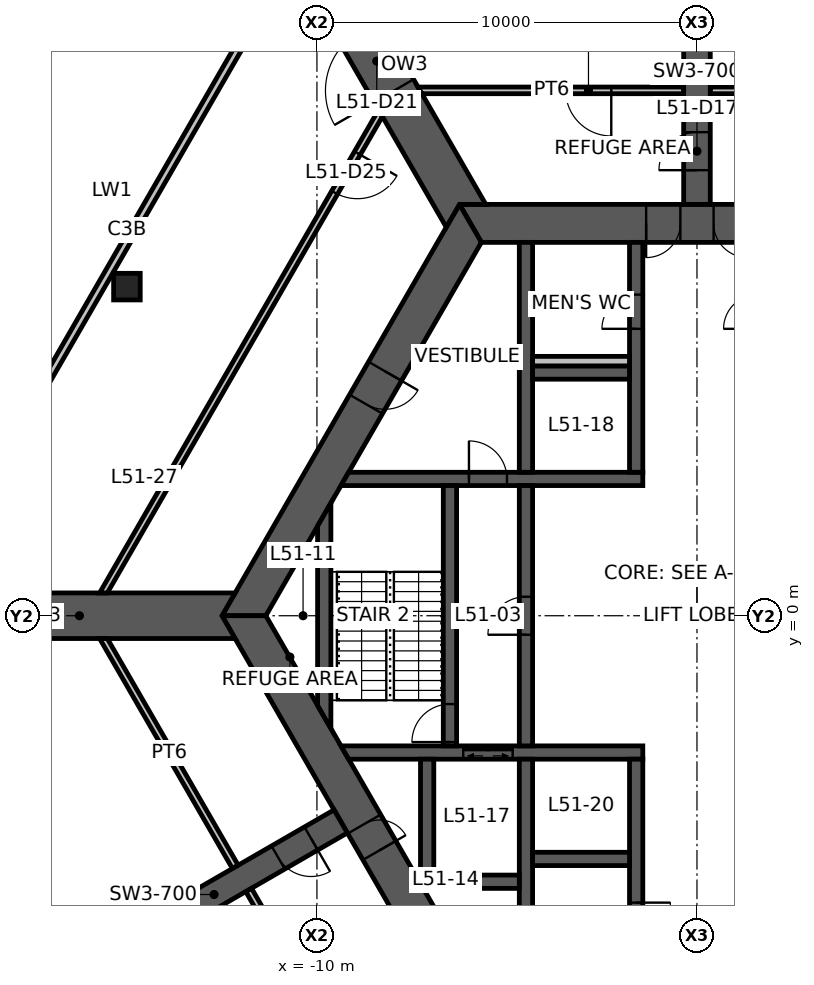
"""IFC4 building model, lengths in metres.
Left out: names, types, materials, properties, quantities, classifications, styles, units other than length and angle.
Written with IfcOpenShell. Run it as: python <this file> out.ifc"""

import sys

from ifc_helpers import new_model, si_unit, direction, frame, frame_2d, origin, origin_2d, place, context, subcontext, project, spatial, polyline, rectangle, hollow_rectangle, outline, extrude, element, fill, save


model = new_model("IFC4")
c1 = context("Model", 3, precision=1e-05, world=origin(), true_north=direction((0.0, 1.0)))
c2 = subcontext(c1, "Body", "Model", "MODEL_VIEW")
j1 = project(units=[si_unit("LENGTHUNIT", "METRE"), si_unit("PLANEANGLEUNIT", "RADIAN")], contexts=[c1])
p1 = place(None, origin())
s1 = spatial("IfcSite", under=j1, at=p1, CompositionType="ELEMENT")
p2 = place(p1, origin())
s2 = spatial("IfcBuilding", under=s1, at=p2, CompositionType="ELEMENT")
p3 = place(p2, frame((0.0, 0.0, 203.3)))
s3 = spatial("IfcBuildingStorey", under=s2, at=p3, CompositionType="ELEMENT", Elevation=203.3)
p4 = place(p3, frame((-15.0, 8.66, 0.0), z_axis=(0.0, 0.0, 1.0), x_axis=(1.0, 0.0, 0.0)))
e1 = element("IfcColumn", 1, at=p4, inside=s3, PredefinedType="COLUMN", context=c2, shape_type="SweptSolid", body=[
    extrude(hollow_rectangle(XDim=0.7, YDim=0.7, WallThickness=0.036, at=origin_2d()), origin(), (0.0, 0.0, 1.0), 5.0),
])
p5 = place(p3, frame((5.961, 10.325, 0.0), z_axis=(0.0, 0.0, 1.0), x_axis=(-1.0, 0.0, 0.0)))
e2 = element("IfcWall", 2, at=p5, inside=s3, PredefinedType="SHEAR", context=c2, shape_type="SweptSolid", body=[
    extrude(outline(polyline([(-0.289, -0.5), (4.624, -0.5), (5.523, -0.5), (6.399, -0.5), (7.299, -0.5), (12.211, -0.5), (11.634, 0.5), (7.299, 0.5), (6.399, 0.5), (5.523, 0.5), (4.624, 0.5), (0.289, 0.5), (-0.289, -0.5)])), origin(), (0.0, 0.0, 1.0), 5.0),
])
p6 = place(p5, frame((6.399, 0.0, 0.0)))
e3 = element("IfcOpeningElement", 3, at=p6, cuts=e2, PredefinedType="OPENING", context=c2, shape_type="SweptSolid", body=[
    extrude(rectangle(XDim=0.9, YDim=2.1, at=frame_2d((0.45, 1.05))), frame((0.0, 0.51, 0.0), z_axis=(0.0, -1.0, 0.0), x_axis=(1.0, 0.0, 0.0)), (0.0, 0.0, 1.0), 1.02),
])
p7 = place(p5, frame((4.624, 0.0, 0.0)))
e4 = element("IfcOpeningElement", 4, at=p7, cuts=e2, PredefinedType="OPENING", context=c2, shape_type="SweptSolid", body=[
    extrude(rectangle(XDim=0.9, YDim=2.1, at=frame_2d((0.45, 1.05))), frame((0.0, 0.51, 0.0), z_axis=(0.0, -1.0, 0.0), x_axis=(1.0, 0.0, 0.0)), (0.0, 0.0, 1.0), 1.02),
])
p8 = place(p3, frame((-5.961, 10.325, 0.0), z_axis=(0.0, 0.0, 1.0), x_axis=(-0.500004296715, -0.866022923061, 0.0)))
e5 = element("IfcWall", 5, at=p8, inside=s3, PredefinedType="SHEAR", context=c2, shape_type="SweptSolid", body=[
    extrude(outline(polyline([(-0.289, -0.5), (4.494, -0.5), (5.494, -0.5), (12.211, -0.5), (11.634, 0.5), (5.494, 0.5), (4.494, 0.5), (0.289, 0.5), (-0.289, -0.5)])), origin(), (0.0, 0.0, 1.0), 5.0),
])
p9 = place(p8, frame((4.494, 0.0, 0.0)))
e6 = element("IfcOpeningElement", 6, at=p9, cuts=e5, PredefinedType="OPENING", context=c2, shape_type="SweptSolid", body=[
    extrude(rectangle(XDim=1.0, YDim=2.1, at=frame_2d((0.5, 1.05))), frame((0.0, 0.51, 0.0), z_axis=(0.0, -1.0, 0.0), x_axis=(1.0, 0.0, 0.0)), (0.0, 0.0, 1.0), 1.02),
])
p10 = place(p3, frame((-11.922, 0.0, 0.0), z_axis=(0.0, 0.0, 1.0), x_axis=(0.500004296715, -0.866022923061, 0.0)))
e7 = element("IfcWall", 7, at=p10, inside=s3, PredefinedType="SHEAR", context=c2, shape_type="SweptSolid", body=[
    extrude(outline(polyline([(-0.289, -0.5), (6.331, -0.5), (7.131, -0.5), (12.211, -0.5), (11.634, 0.5), (7.131, 0.5), (6.331, 0.5), (0.289, 0.5), (-0.289, -0.5)])), origin(), (0.0, 0.0, 1.0), 5.0),
])
p11 = place(p10, frame((6.331, 0.0, 0.0)))
e8 = element("IfcOpeningElement", 8, at=p11, cuts=e7, PredefinedType="OPENING", context=c2, shape_type="SweptSolid", body=[
    extrude(rectangle(XDim=0.8, YDim=2.1, at=frame_2d((0.4, 1.05))), frame((0.0, 0.51, 0.0), z_axis=(0.0, -1.0, 0.0), x_axis=(1.0, 0.0, 0.0)), (0.0, 0.0, 1.0), 1.02),
])
p12 = place(p3, frame((0.0, 10.825, 0.0), z_axis=(0.0, 0.0, 1.0), x_axis=(0.0, 1.0, 0.0)))
e9 = element("IfcWall", 9, at=p12, inside=s3, PredefinedType="SHEAR", context=c2, shape_type="SweptSolid", body=[
    extrude(rectangle(XDim=6.946, YDim=0.7, at=frame_2d((3.473, 0.0))), origin(), (0.0, 0.0, 1.0), 5.0),
])
p13 = place(p12, frame((0.9, 0.0, 0.0)))
e10 = element("IfcOpeningElement", 10, at=p13, cuts=e9, PredefinedType="OPENING", context=c2, shape_type="SweptSolid", body=[
    extrude(rectangle(XDim=1.0, YDim=2.1, at=frame_2d((0.5, 1.05))), frame((0.0, 0.36, 0.0), z_axis=(0.0, -1.0, 0.0), x_axis=(1.0, 0.0, 0.0)), (0.0, 0.0, 1.0), 0.72),
])
p14 = place(p3, frame((-9.375, -5.413, 0.0), z_axis=(0.0, 0.0, 1.0), x_axis=(-0.866032377459, -0.499987921047, 0.0)))
e11 = element("IfcWall", 11, at=p14, inside=s3, PredefinedType="SHEAR", context=c2, shape_type="SweptSolid", body=[
    extrude(rectangle(XDim=7.696, YDim=0.7, at=frame_2d((3.848, 0.0))), origin(), (0.0, 0.0, 1.0), 5.0),
])
p15 = place(p14, frame((0.9, 0.0, 0.0)))
e12 = element("IfcOpeningElement", 12, at=p15, cuts=e11, PredefinedType="OPENING", context=c2, shape_type="SweptSolid", body=[
    extrude(rectangle(XDim=1.0, YDim=2.1, at=frame_2d((0.5, 1.05))), frame((0.0, 0.36, 0.0), z_axis=(0.0, -1.0, 0.0), x_axis=(1.0, 0.0, 0.0)), (0.0, 0.0, 1.0), 0.72),
])
p16 = place(p3, frame((-6.25, 10.825, -1.15), z_axis=(0.0, 0.0, 1.0), x_axis=(-0.50000045744, 0.866025139681, 0.0)))
e13 = element("IfcWall", 13, at=p16, inside=s3, PredefinedType="SHEAR", context=c2, shape_type="SweptSolid", body=[
    extrude(outline(polyline([(-0.346, -0.6), (3.453, -0.6), (5.253, -0.6), (7.5, -0.6), (7.5, 0.6), (5.253, 0.6), (3.453, 0.6), (-0.346, 0.6), (0.0, 0.0), (-0.346, -0.6)])), origin(), (0.0, 0.0, 1.0), 6.15),
])
p17 = place(p16, frame((3.453, 0.0, 1.15)))
e14 = element("IfcOpeningElement", 14, at=p17, cuts=e13, PredefinedType="OPENING", context=c2, shape_type="SweptSolid", body=[
    extrude(rectangle(XDim=1.8, YDim=2.4, at=frame_2d((0.9, 1.2))), frame((0.0, 0.61, 0.0), z_axis=(0.0, -1.0, 0.0), x_axis=(1.0, 0.0, 0.0)), (0.0, 0.0, 1.0), 1.22),
])
p18 = place(p3, frame((-12.5, 0.0, -1.15), z_axis=(0.0, 0.0, 1.0), x_axis=(-1.0, 0.0, 0.0)))
e15 = element("IfcWall", 15, at=p18, inside=s3, PredefinedType="SHEAR", context=c2, shape_type="SweptSolid", body=[
    extrude(outline(polyline([(-0.346, -0.6), (7.5, -0.6), (7.5, 0.6), (-0.346, 0.6), (0.0, 0.0), (-0.346, -0.6)])), origin(), (0.0, 0.0, 1.0), 6.15),
])
p19 = place(p3, frame((-10.396, 17.834, 0.0), z_axis=(0.0, 0.0, 1.0), x_axis=(-0.499993861681, -0.866028947716, 0.0)))
e16 = element("IfcWall", 16, at=p19, inside=s3, PredefinedType="ELEMENTEDWALL", context=c2, shape_type="SweptSolid", body=[
    extrude(rectangle(XDim=19.986, YDim=0.2, at=frame_2d((9.993, 0.0))), origin(), (0.0, 0.0, 1.0), 5.0),
])
p20 = place(p3, frame((-9.266, 3.6, 0.0), z_axis=(0.0, 0.0, 1.0), x_axis=(1.0, 0.0, 0.0)))
e17 = element("IfcWall", 17, at=p20, inside=s3, PredefinedType="SHEAR", context=c2, shape_type="SweptSolid", body=[
    extrude(outline(polyline([(-0.101, -0.175), (3.266, -0.175), (4.266, -0.175), (7.841, -0.175), (7.841, 0.175), (4.266, 0.175), (3.266, 0.175), (0.101, 0.175), (-0.101, -0.175)])), origin(), (0.0, 0.0, 1.0), 5.0),
])
p21 = place(p20, frame((3.266, 0.0, 0.0)))
e18 = element("IfcOpeningElement", 18, at=p21, cuts=e17, PredefinedType="OPENING", context=c2, shape_type="SweptSolid", body=[
    extrude(rectangle(XDim=1.0, YDim=2.1, at=frame_2d((0.5, 1.05))), frame((0.0, 0.185, 0.0), z_axis=(0.0, -1.0, 0.0), x_axis=(1.0, 0.0, 0.0)), (0.0, 0.0, 1.0), 0.37),
])
p22 = place(p3, frame((-9.266, -3.6, 0.0), z_axis=(0.0, 0.0, 1.0), x_axis=(1.0, 0.0, 0.0)))
e19 = element("IfcWall", 19, at=p22, inside=s3, PredefinedType="SHEAR", context=c2, shape_type="SweptSolid", body=[
    extrude(outline(polyline([(0.101, -0.175), (3.116, -0.175), (4.417, -0.175), (7.841, -0.175), (7.841, 0.175), (4.417, 0.175), (3.116, 0.175), (-0.101, 0.175), (0.101, -0.175)])), origin(), (0.0, 0.0, 1.0), 5.0),
])
p23 = place(p22, frame((3.116, 0.0, 0.0)))
e20 = element("IfcOpeningElement", 20, at=p23, cuts=e19, PredefinedType="OPENING", context=c2, shape_type="SweptSolid", body=[
    extrude(rectangle(XDim=1.3, YDim=2.1, at=frame_2d((0.65, 1.05))), frame((0.0, 0.185, 0.0), z_axis=(0.0, -1.0, 0.0), x_axis=(1.0, 0.0, 0.0)), (0.0, 0.0, 1.0), 0.37),
])
p24 = place(p3, frame((-1.6, 3.775, 0.0), z_axis=(0.0, 0.0, 1.0), x_axis=(0.0, 1.0, 0.0)))
e21 = element("IfcWall", 21, at=p24, inside=s3, PredefinedType="SHEAR", context=c2, shape_type="SweptSolid", body=[
    extrude(rectangle(XDim=6.05, YDim=0.35, at=frame_2d((3.025, 0.0))), origin(), (0.0, 0.0, 1.0), 5.0),
])
p25 = place(p24, frame((3.775, 0.0, 0.0)))
e22 = element("IfcOpeningElement", 22, at=p25, cuts=e21, PredefinedType="OPENING", context=c2, shape_type="SweptSolid", body=[
    extrude(rectangle(XDim=0.9, YDim=2.1, at=frame_2d((0.45, 1.05))), frame((0.0, 0.185, 0.0), z_axis=(0.0, -1.0, 0.0), x_axis=(1.0, 0.0, 0.0)), (0.0, 0.0, 1.0), 0.37),
])
p26 = place(p3, frame((-1.6, -3.775, 0.0), z_axis=(0.0, 0.0, 1.0), x_axis=(0.0, -1.0, 0.0)))
e23 = element("IfcWall", 23, at=p26, inside=s3, PredefinedType="SHEAR", context=c2, shape_type="SweptSolid", body=[
    extrude(rectangle(XDim=6.05, YDim=0.35, at=frame_2d((3.025, 0.0))), origin(), (0.0, 0.0, 1.0), 5.0),
])
p27 = place(p26, frame((3.775, 0.0, 0.0)))
e24 = element("IfcOpeningElement", 24, at=p27, cuts=e23, PredefinedType="OPENING", context=c2, shape_type="SweptSolid", body=[
    extrude(rectangle(XDim=0.9, YDim=2.1, at=frame_2d((0.45, 1.05))), frame((0.0, 0.185, 0.0), z_axis=(0.0, -1.0, 0.0), x_axis=(1.0, 0.0, 0.0)), (0.0, 0.0, 1.0), 0.37),
])
p28 = place(p3, frame((-4.5, -3.425, 0.0), z_axis=(0.0, 0.0, 1.0), x_axis=(0.0, 1.0, 0.0)))
e25 = element("IfcWall", 25, at=p28, inside=s3, PredefinedType="SHEAR", context=c2, shape_type="SweptSolid", body=[
    extrude(rectangle(XDim=6.85, YDim=0.35, at=frame_2d((3.425, 0.0))), origin(), (0.0, 0.0, 1.0), 5.0),
])
p29 = place(p28, frame((2.925, 0.0, 0.0)))
e26 = element("IfcOpeningElement", 26, at=p29, cuts=e25, PredefinedType="OPENING", context=c2, shape_type="SweptSolid", body=[
    extrude(rectangle(XDim=1.0, YDim=2.1, at=frame_2d((0.5, 1.05))), frame((0.0, 0.185, 0.0), z_axis=(0.0, -1.0, 0.0), x_axis=(1.0, 0.0, 0.0)), (0.0, 0.0, 1.0), 0.37),
])
p30 = place(p3, frame((-6.5, -3.425, 0.0), z_axis=(0.0, 0.0, 1.0), x_axis=(0.0, 1.0, 0.0)))
e27 = element("IfcWall", 27, at=p30, inside=s3, PredefinedType="SHEAR", context=c2, shape_type="SweptSolid", body=[
    extrude(rectangle(XDim=6.85, YDim=0.35, at=frame_2d((3.425, 0.0))), origin(), (0.0, 0.0, 1.0), 5.0),
])
p31 = place(p30, frame((0.1, 0.0, 0.0)))
e28 = element("IfcOpeningElement", 28, at=p31, cuts=e27, PredefinedType="OPENING", context=c2, shape_type="SweptSolid", body=[
    extrude(rectangle(XDim=1.0, YDim=2.1, at=frame_2d((0.5, 1.05))), frame((0.0, 0.185, 0.0), z_axis=(0.0, -1.0, 0.0), x_axis=(1.0, 0.0, 0.0)), (0.0, 0.0, 1.0), 0.37),
])
for number, where, z_axis, x_axis in (
    (29, (-4.5, 3.775, 0.0), (0.0, 0.0, 1.0), (0.0, 1.0, 0.0)),
    (30, (-4.5, -3.775, 0.0), (0.0, 0.0, 1.0), (0.0, -1.0, 0.0)),
):
    element("IfcWall", number, at=place(p3, frame(where, z_axis=z_axis, x_axis=x_axis)), inside=s3, PredefinedType="SHEAR", context=c2, shape_type="SweptSolid", body=[
        extrude(rectangle(XDim=6.05, YDim=0.35, at=frame_2d((3.025, 0.0))), origin(), (0.0, 0.0, 1.0), 5.0),
    ])
for number, where, z_axis, x_axis in (
    (31, (-4.325, 6.4, 0.0), (0.0, 0.0, 1.0), (1.0, 0.0, 0.0)),
    (32, (-4.325, -6.4, 0.0), (0.0, 0.0, 1.0), (1.0, 0.0, 0.0)),
):
    element("IfcWall", number, at=place(p3, frame(where, z_axis=z_axis, x_axis=x_axis)), inside=s3, PredefinedType="SHEAR", context=c2, shape_type="SweptSolid", body=[
        extrude(rectangle(XDim=2.55, YDim=0.35, at=frame_2d((1.275, 0.0))), origin(), (0.0, 0.0, 1.0), 5.0),
    ])
p32 = place(p3, frame((-6.925, -7.0, 0.0), z_axis=(0.0, 0.0, 1.0), x_axis=(1.0, 0.0, 0.0)))
e33 = element("IfcWall", 33, at=p32, inside=s3, PredefinedType="SHEAR", context=c2, shape_type="SweptSolid", body=[
    extrude(rectangle(XDim=2.25, YDim=0.35, at=frame_2d((1.125, 0.0))), origin(), (0.0, 0.0, 1.0), 5.0),
])
p33 = place(p3, frame((-7.1, -3.775, 0.0), z_axis=(0.0, 0.0, 1.0), x_axis=(0.0, -1.0, 0.0)))
e34 = element("IfcWall", 34, at=p33, inside=s3, PredefinedType="SHEAR", context=c2, shape_type="SweptSolid", body=[
    extrude(outline(polyline([(0.0, -0.175), (3.274, -0.175), (3.4, 0.0), (3.4, 0.175), (0.0, 0.175), (0.0, -0.175)])), origin(), (0.0, 0.0, 1.0), 5.0),
])
p34 = place(p3, frame((-9.808, -2.662, 0.0), z_axis=(0.0, 0.0, 1.0), x_axis=(0.0, 1.0, 0.0)))
e35 = element("IfcWall", 35, at=p34, inside=s3, PredefinedType="SHEAR", context=c2, shape_type="SweptSolid", body=[
    extrude(outline(polyline([(-0.303, -0.175), (5.628, -0.175), (5.021, 0.175), (0.303, 0.175), (-0.303, -0.175)])), origin(), (0.0, 0.0, 1.0), 5.0),
])
p35 = place(p3, frame((-4.325, 6.7, 0.0), z_axis=(0.0, 0.0, 1.0), x_axis=(1.0, 0.0, 0.0)))
e36 = element("IfcWall", 36, at=p35, inside=s3, PredefinedType="PLUMBINGWALL", context=c2, shape_type="SweptSolid", body=[
    extrude(rectangle(XDim=2.55, YDim=0.25, at=frame_2d((1.275, 0.0))), origin(), (0.0, 0.0, 1.0), 5.0),
])
p36 = place(p3, frame((7.289, 13.825, 0.0), z_axis=(0.0, 0.0, 1.0), x_axis=(-1.0, 0.0, 0.0)))
e37 = element("IfcWall", 37, at=p36, inside=s3, PredefinedType="PARTITIONING", context=c2, shape_type="SweptSolid", body=[
    extrude(outline(polyline([(-0.051, -0.087), (6.934, -0.087), (6.934, 0.087), (0.051, 0.087), (-0.051, -0.087)])), origin(), (0.0, 0.0, 1.0), 4.8),
])
p37 = place(p3, frame((-0.355, 13.825, 0.0), z_axis=(0.0, 0.0, 1.0), x_axis=(-1.0, 0.0, 0.0)))
e38 = element("IfcWall", 38, at=p37, inside=s3, PredefinedType="PARTITIONING", context=c2, shape_type="SweptSolid", body=[
    extrude(outline(polyline([(0.0, -0.087), (1.9, -0.087), (3.1, -0.087), (6.985, -0.087), (6.884, 0.087), (3.1, 0.087), (1.9, 0.087), (0.0, 0.087), (0.0, -0.087)])), origin(), (0.0, 0.0, 1.0), 4.8),
])
p38 = place(p37, frame((1.9, 0.0, 0.0)))
e39 = element("IfcOpeningElement", 39, at=p38, cuts=e38, PredefinedType="OPENING", context=c2, shape_type="SweptSolid", body=[
    extrude(rectangle(XDim=1.2, YDim=2.1, at=frame_2d((0.6, 1.05))), frame((0.0, 0.098, 0.0), z_axis=(0.0, -1.0, 0.0), x_axis=(1.0, 0.0, 0.0)), (0.0, 0.0, 1.0), 0.195),
])
p39 = place(p3, frame((-8.328, 13.225, 0.0), z_axis=(0.0, 0.0, 1.0), x_axis=(-0.499988229334, -0.866032199475, 0.0)))
e40 = element("IfcWall", 40, at=p39, inside=s3, PredefinedType="PARTITIONING", context=c2, shape_type="SweptSolid", body=[
    extrude(outline(polyline([(-0.051, -0.087), (1.213, -0.087), (2.413, -0.087), (14.628, -0.087), (14.527, 0.087), (2.413, 0.087), (1.213, 0.087), (0.051, 0.087), (-0.051, -0.087)])), origin(), (0.0, 0.0, 1.0), 4.8),
])
p40 = place(p39, frame((1.213, 0.0, 0.0)))
e41 = element("IfcOpeningElement", 41, at=p40, cuts=e40, PredefinedType="OPENING", context=c2, shape_type="SweptSolid", body=[
    extrude(rectangle(XDim=1.2, YDim=2.1, at=frame_2d((0.6, 1.05))), frame((0.0, 0.098, 0.0), z_axis=(0.0, -1.0, 0.0), x_axis=(1.0, 0.0, 0.0)), (0.0, 0.0, 1.0), 0.195),
])
p41 = place(p3, frame((-15.617, -0.6, 0.0), z_axis=(0.0, 0.0, 1.0), x_axis=(0.499986605379, -0.866033137035, 0.0)))
e42 = element("IfcWall", 42, at=p41, inside=s3, PredefinedType="PARTITIONING", context=c2, shape_type="SweptSolid", body=[
    extrude(outline(polyline([(-0.051, -0.087), (6.934, -0.087), (6.934, 0.087), (0.051, 0.087), (-0.051, -0.087)])), origin(), (0.0, 0.0, 1.0), 4.8),
])
p42 = place(p3, frame((-11.795, -7.22, 0.0), z_axis=(0.0, 0.0, 1.0), x_axis=(0.49999776677, -0.866026693137, 0.0)))
e43 = element("IfcWall", 43, at=p42, inside=s3, PredefinedType="PARTITIONING", context=c2, shape_type="SweptSolid", body=[
    extrude(outline(polyline([(0.0, -0.087), (1.9, -0.087), (3.1, -0.087), (6.985, -0.087), (6.884, 0.087), (3.1, 0.087), (1.9, 0.087), (0.0, 0.087), (0.0, -0.087)])), origin(), (0.0, 0.0, 1.0), 4.8),
])
p43 = place(p42, frame((1.9, 0.0, 0.0)))
e44 = element("IfcOpeningElement", 44, at=p43, cuts=e43, PredefinedType="OPENING", context=c2, shape_type="SweptSolid", body=[
    extrude(rectangle(XDim=1.2, YDim=2.1, at=frame_2d((0.6, 1.05))), frame((0.0, 0.098, 0.0), z_axis=(0.0, -1.0, 0.0), x_axis=(1.0, 0.0, 0.0)), (0.0, 0.0, 1.0), 0.195),
])
p44 = place(p6, origin())
e45 = element("IfcDoor", 45, at=p44, inside=s3, OperationType="SINGLE_SWING_RIGHT", PredefinedType="DOOR", context=c2, shape_type="SweptSolid", body=[
    extrude(rectangle(XDim=0.9, YDim=2.1, at=frame_2d((0.45, 1.05))), frame((0.0, 0.025, 0.0), z_axis=(0.0, -1.0, 0.0), x_axis=(1.0, 0.0, 0.0)), (0.0, 0.0, 1.0), 0.05),
])
fill(e3, e45)
p45 = place(p7, origin())
e46 = element("IfcDoor", 46, at=p45, inside=s3, OperationType="SINGLE_SWING_LEFT", PredefinedType="DOOR", context=c2, shape_type="SweptSolid", body=[
    extrude(rectangle(XDim=0.9, YDim=2.1, at=frame_2d((0.45, 1.05))), frame((0.0, 0.025, 0.0), z_axis=(0.0, -1.0, 0.0), x_axis=(1.0, 0.0, 0.0)), (0.0, 0.0, 1.0), 0.05),
])
fill(e4, e46)
p46 = place(p11, origin())
e47 = element("IfcDoor", 47, at=p46, inside=s3, OperationType="SINGLE_SWING_RIGHT", PredefinedType="DOOR", context=c2, shape_type="SweptSolid", body=[
    extrude(rectangle(XDim=0.8, YDim=2.1, at=frame_2d((0.4, 1.05))), frame((0.0, 0.025, 0.0), z_axis=(0.0, -1.0, 0.0), x_axis=(1.0, 0.0, 0.0)), (0.0, 0.0, 1.0), 0.05),
])
fill(e8, e47)
p47 = place(p9, origin())
e48 = element("IfcDoor", 48, at=p47, inside=s3, OperationType="SINGLE_SWING_LEFT", PredefinedType="DOOR", context=c2, shape_type="SweptSolid", body=[
    extrude(rectangle(XDim=1.0, YDim=2.1, at=frame_2d((0.5, 1.05))), frame((0.0, 0.025, 0.0), z_axis=(0.0, -1.0, 0.0), x_axis=(1.0, 0.0, 0.0)), (0.0, 0.0, 1.0), 0.05),
])
fill(e6, e48)
p48 = place(p29, origin())
e49 = element("IfcDoor", 49, at=p48, inside=s3, OperationType="SINGLE_SWING_LEFT", PredefinedType="DOOR", context=c2, shape_type="SweptSolid", body=[
    extrude(rectangle(XDim=1.0, YDim=2.1, at=frame_2d((0.5, 1.05))), frame((0.0, 0.025, 0.0), z_axis=(0.0, -1.0, 0.0), x_axis=(1.0, 0.0, 0.0)), (0.0, 0.0, 1.0), 0.05),
])
fill(e26, e49)
p49 = place(p31, origin())
e50 = element("IfcDoor", 50, at=p49, inside=s3, OperationType="SINGLE_SWING_LEFT", PredefinedType="DOOR", context=c2, shape_type="SweptSolid", body=[
    extrude(rectangle(XDim=1.0, YDim=2.1, at=frame_2d((0.5, 1.05))), frame((0.0, 0.025, 0.0), z_axis=(0.0, -1.0, 0.0), x_axis=(1.0, 0.0, 0.0)), (0.0, 0.0, 1.0), 0.05),
])
fill(e28, e50)
p50 = place(p21, origin())
e51 = element("IfcDoor", 51, at=p50, inside=s3, OperationType="SINGLE_SWING_LEFT", PredefinedType="DOOR", context=c2, shape_type="SweptSolid", body=[
    extrude(rectangle(XDim=1.0, YDim=2.1, at=frame_2d((0.5, 1.05))), frame((0.0, 0.025, 0.0), z_axis=(0.0, -1.0, 0.0), x_axis=(1.0, 0.0, 0.0)), (0.0, 0.0, 1.0), 0.05),
])
fill(e18, e51)
p51 = place(p25, origin())
e52 = element("IfcDoor", 52, at=p51, inside=s3, OperationType="SINGLE_SWING_LEFT", PredefinedType="DOOR", context=c2, shape_type="SweptSolid", body=[
    extrude(rectangle(XDim=0.9, YDim=2.1, at=frame_2d((0.45, 1.05))), frame((0.0, 0.025, 0.0), z_axis=(0.0, -1.0, 0.0), x_axis=(1.0, 0.0, 0.0)), (0.0, 0.0, 1.0), 0.05),
])
fill(e22, e52)
p52 = place(p27, origin())
e53 = element("IfcDoor", 53, at=p52, inside=s3, OperationType="SINGLE_SWING_LEFT", PredefinedType="DOOR", context=c2, shape_type="SweptSolid", body=[
    extrude(rectangle(XDim=0.9, YDim=2.1, at=frame_2d((0.45, 1.05))), frame((0.0, 0.025, 0.0), z_axis=(0.0, -1.0, 0.0), x_axis=(1.0, 0.0, 0.0)), (0.0, 0.0, 1.0), 0.05),
])
fill(e24, e53)
p53 = place(p13, origin())
e54 = element("IfcDoor", 54, at=p53, inside=s3, OperationType="SINGLE_SWING_LEFT", PredefinedType="DOOR", context=c2, shape_type="SweptSolid", body=[
    extrude(rectangle(XDim=1.0, YDim=2.1, at=frame_2d((0.5, 1.05))), frame((0.0, 0.025, 0.0), z_axis=(0.0, -1.0, 0.0), x_axis=(1.0, 0.0, 0.0)), (0.0, 0.0, 1.0), 0.05),
])
fill(e10, e54)
p54 = place(p15, origin())
e55 = element("IfcDoor", 55, at=p54, inside=s3, OperationType="SINGLE_SWING_LEFT", PredefinedType="DOOR", context=c2, shape_type="SweptSolid", body=[
    extrude(rectangle(XDim=1.0, YDim=2.1, at=frame_2d((0.5, 1.05))), frame((0.0, 0.025, 0.0), z_axis=(0.0, -1.0, 0.0), x_axis=(1.0, 0.0, 0.0)), (0.0, 0.0, 1.0), 0.05),
])
fill(e12, e55)
p55 = place(p17, origin())
e56 = element("IfcDoor", 56, at=p55, inside=s3, OperationType="DOUBLE_DOOR_SINGLE_SWING", PredefinedType="DOOR", context=c2, shape_type="SweptSolid", body=[
    extrude(rectangle(XDim=1.8, YDim=2.4, at=frame_2d((0.9, 1.2))), frame((0.0, 0.025, 0.0), z_axis=(0.0, -1.0, 0.0), x_axis=(1.0, 0.0, 0.0)), (0.0, 0.0, 1.0), 0.05),
])
fill(e14, e56)
p56 = place(p38, origin())
e57 = element("IfcDoor", 57, at=p56, inside=s3, OperationType="DOUBLE_DOOR_SINGLE_SWING", PredefinedType="DOOR", context=c2, shape_type="SweptSolid", body=[
    extrude(rectangle(XDim=1.2, YDim=2.1, at=frame_2d((0.6, 1.05))), frame((0.0, 0.025, 0.0), z_axis=(0.0, -1.0, 0.0), x_axis=(1.0, 0.0, 0.0)), (0.0, 0.0, 1.0), 0.05),
])
fill(e39, e57)
p57 = place(p40, origin())
e58 = element("IfcDoor", 58, at=p57, inside=s3, OperationType="DOUBLE_DOOR_SINGLE_SWING", PredefinedType="DOOR", context=c2, shape_type="SweptSolid", body=[
    extrude(rectangle(XDim=1.2, YDim=2.1, at=frame_2d((0.6, 1.05))), frame((0.0, 0.025, 0.0), z_axis=(0.0, -1.0, 0.0), x_axis=(1.0, 0.0, 0.0)), (0.0, 0.0, 1.0), 0.05),
])
fill(e41, e58)
p58 = place(p23, origin())
e59 = element("IfcDoor", 59, at=p58, inside=s3, OperationType="DOUBLE_DOOR_SLIDING", PredefinedType="DOOR", context=c2, shape_type="SweptSolid", body=[
    extrude(rectangle(XDim=1.3, YDim=2.1, at=frame_2d((0.65, 1.05))), frame((0.0, 0.025, 0.0), z_axis=(0.0, -1.0, 0.0), x_axis=(1.0, 0.0, 0.0)), (0.0, 0.0, 1.0), 0.05),
])
fill(e20, e59)
save(model, sys.argv[1])
